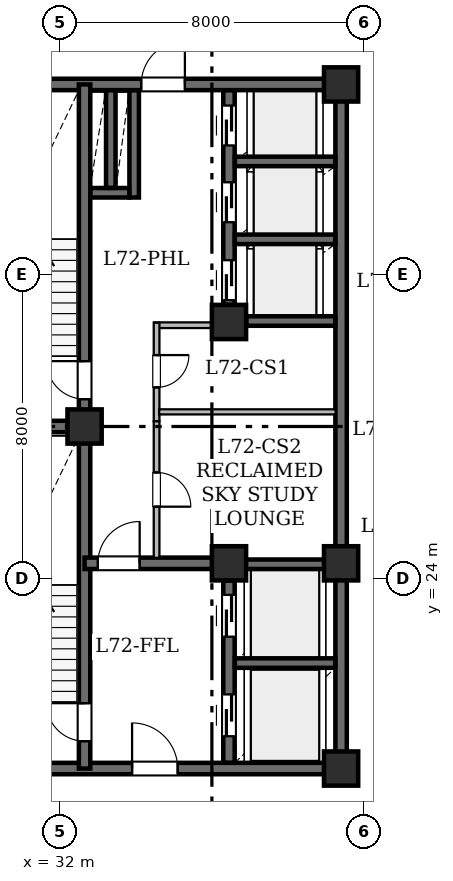
"""IFC4 building model, lengths in metres.
Left out: names, types, materials, properties, quantities, classifications, styles, units other than length and angle.
Written with IfcOpenShell. Run it as: python <this file> out.ifc"""

import sys

from ifc_helpers import new_model, si_unit, direction, frame, frame_2d, origin, origin_2d, place, context, subcontext, project, spatial, rectangle, hollow_rectangle, extrude, element, fill, save


model = new_model("IFC4")
c1 = context("Model", 3, precision=1e-05, world=origin(), true_north=direction((0.0, 1.0)))
c2 = subcontext(c1, "Body", "Model", "MODEL_VIEW")
j1 = project(units=[si_unit("LENGTHUNIT", "METRE"), si_unit("PLANEANGLEUNIT", "RADIAN")], contexts=[c1])
p1 = place(None, origin())
s1 = spatial("IfcSite", under=j1, at=p1, CompositionType="ELEMENT")
p2 = place(p1, origin())
s2 = spatial("IfcBuilding", under=s1, at=p2, CompositionType="ELEMENT")
p3 = place(p2, frame((0.0, 0.0, 282.05)))
s3 = spatial("IfcBuildingStorey", under=s2, at=p3, CompositionType="ELEMENT", Elevation=282.05)
for number, where, z_axis, x_axis in (
    (1, (32.65, 28.0, 0.0), (0.0, 0.0, 1.0), (1.0, 0.0, 0.0)),
    (2, (39.4, 19.0, 0.0), (0.0, 0.0, 1.0), (1.0, 0.0, 0.0)),
    (3, (36.45, 24.4, 0.0), (0.0, 0.0, 1.0), (1.0, 0.0, 0.0)),
    (4, (39.4, 24.4, 0.0), (0.0, 0.0, 1.0), (1.0, 0.0, 0.0)),
    (5, (36.45, 30.75, 0.0), (0.0, 0.0, 1.0), (1.0, 0.0, 0.0)),
    (6, (39.4, 37.0, 0.0), (0.0, 0.0, 1.0), (1.0, 0.0, 0.0)),
):
    element("IfcColumn", number, at=place(p3, frame(where, z_axis=z_axis, x_axis=x_axis)), inside=s3, PredefinedType="COLUMN", context=c2, shape_type="SweptSolid", body=[
        extrude(hollow_rectangle(XDim=0.9, YDim=0.9, WallThickness=0.045, at=origin_2d()), origin(), (0.0, 0.0, 1.0), 4.2),
    ])
p4 = place(p3, frame((29.0, 19.0, 0.0), z_axis=(0.0, 0.0, 1.0), x_axis=(1.0, 0.0, 0.0)))
e7 = element("IfcWall", 7, at=p4, inside=s3, PredefinedType="SHEAR", context=c2, shape_type="SweptSolid", body=[
    extrude(rectangle(XDim=10.4, YDim=0.3, at=frame_2d((5.2, 0.0))), origin(), (0.0, 0.0, 1.0), 3.78),
])
p5 = place(p4, frame((4.9, 0.0, 0.0)))
e8 = element("IfcOpeningElement", 8, at=p5, cuts=e7, PredefinedType="OPENING", context=c2, shape_type="SweptSolid", body=[
    extrude(rectangle(XDim=1.2, YDim=2.15, at=frame_2d((0.6, 1.075))), frame((0.0, 0.16, 0.0), z_axis=(0.0, -1.0, 0.0), x_axis=(1.0, 0.0, 0.0)), (0.0, 0.0, 1.0), 0.32),
])
p6 = place(p3, frame((29.0, 37.0, 0.0), z_axis=(0.0, 0.0, 1.0), x_axis=(1.0, 0.0, 0.0)))
e9 = element("IfcWall", 9, at=p6, inside=s3, PredefinedType="SHEAR", context=c2, shape_type="SweptSolid", body=[
    extrude(rectangle(XDim=10.4, YDim=0.3, at=frame_2d((5.2, 0.0))), origin(), (0.0, 0.0, 1.0), 3.78),
])
p7 = place(p6, frame((5.14, 0.0, 0.0)))
e10 = element("IfcOpeningElement", 10, at=p7, cuts=e9, PredefinedType="OPENING", context=c2, shape_type="SweptSolid", body=[
    extrude(rectangle(XDim=1.15, YDim=2.2, at=frame_2d((0.575, 1.1))), frame((0.0, 0.16, 0.0), z_axis=(0.0, -1.0, 0.0), x_axis=(1.0, 0.0, 0.0)), (0.0, 0.0, 1.0), 0.32),
])
p8 = place(p3, frame((39.4, 19.0, 0.0), z_axis=(0.0, 0.0, 1.0), x_axis=(0.0, 1.0, 0.0)))
e11 = element("IfcWall", 11, at=p8, inside=s3, PredefinedType="SHEAR", context=c2, shape_type="SweptSolid", body=[
    extrude(rectangle(XDim=5.4, YDim=0.3, at=frame_2d((2.7, 0.0))), origin(), (0.0, 0.0, 1.0), 3.78),
])
p9 = place(p3, frame((39.4, 24.4, 0.0), z_axis=(0.0, 0.0, 1.0), x_axis=(0.0, 1.0, 0.0)))
e12 = element("IfcWall", 12, at=p9, inside=s3, PredefinedType="SHEAR", context=c2, shape_type="SweptSolid", body=[
    extrude(rectangle(XDim=12.6, YDim=0.3, at=frame_2d((6.3, 0.0))), origin(), (0.0, 0.0, 1.0), 3.78),
])
p10 = place(p3, frame((32.65, 19.0, 0.0), z_axis=(0.0, 0.0, 1.0), x_axis=(0.0, 1.0, 0.0)))
e13 = element("IfcWall", 13, at=p10, inside=s3, PredefinedType="SHEAR", context=c2, shape_type="SweptSolid", body=[
    extrude(rectangle(XDim=9.0, YDim=0.3, at=frame_2d((4.5, 0.0))), origin(), (0.0, 0.0, 1.0), 3.78),
])
p11 = place(p10, frame((0.72, 0.0, 0.0)))
e14 = element("IfcOpeningElement", 14, at=p11, cuts=e13, PredefinedType="OPENING", context=c2, shape_type="SweptSolid", body=[
    extrude(rectangle(XDim=1.0, YDim=2.15, at=frame_2d((0.5, 1.075))), frame((0.0, 0.16, 0.0), z_axis=(0.0, -1.0, 0.0), x_axis=(1.0, 0.0, 0.0)), (0.0, 0.0, 1.0), 0.32),
])
p12 = place(p3, frame((32.65, 28.0, 0.0), z_axis=(0.0, 0.0, 1.0), x_axis=(0.0, 1.0, 0.0)))
e15 = element("IfcWall", 15, at=p12, inside=s3, PredefinedType="SHEAR", context=c2, shape_type="SweptSolid", body=[
    extrude(rectangle(XDim=9.0, YDim=0.3, at=frame_2d((4.5, 0.0))), origin(), (0.0, 0.0, 1.0), 3.78),
])
p13 = place(p12, frame((0.72, 0.0, 0.0)))
e16 = element("IfcOpeningElement", 16, at=p13, cuts=e15, PredefinedType="OPENING", context=c2, shape_type="SweptSolid", body=[
    extrude(rectangle(XDim=1.0, YDim=2.15, at=frame_2d((0.5, 1.075))), frame((0.0, 0.16, 0.0), z_axis=(0.0, -1.0, 0.0), x_axis=(1.0, 0.0, 0.0)), (0.0, 0.0, 1.0), 0.32),
])
p14 = place(p3, frame((29.0, 28.0, 0.0), z_axis=(0.0, 0.0, 1.0), x_axis=(1.0, 0.0, 0.0)))
e17 = element("IfcWall", 17, at=p14, inside=s3, PredefinedType="SHEAR", context=c2, shape_type="SweptSolid", body=[
    extrude(rectangle(XDim=3.65, YDim=0.3, at=frame_2d((1.825, 0.0))), origin(), (0.0, 0.0, 1.0), 3.78),
])
p15 = place(p3, frame((32.65, 24.4, 0.0), z_axis=(0.0, 0.0, 1.0), x_axis=(1.0, 0.0, 0.0)))
e18 = element("IfcWall", 18, at=p15, inside=s3, PredefinedType="SHEAR", context=c2, shape_type="SweptSolid", body=[
    extrude(rectangle(XDim=3.8, YDim=0.3, at=frame_2d((1.9, 0.0))), origin(), (0.0, 0.0, 1.0), 3.78),
])
p16 = place(p15, frame((0.35, 0.0, 0.0)))
e19 = element("IfcOpeningElement", 19, at=p16, cuts=e18, PredefinedType="OPENING", context=c2, shape_type="SweptSolid", body=[
    extrude(rectangle(XDim=1.1, YDim=2.15, at=frame_2d((0.55, 1.075))), frame((0.0, 0.16, 0.0), z_axis=(0.0, -1.0, 0.0), x_axis=(1.0, 0.0, 0.0)), (0.0, 0.0, 1.0), 0.32),
])
p17 = place(p3, frame((36.45, 19.154, 0.0), z_axis=(0.0, 0.0, 1.0), x_axis=(0.0, 1.0, 0.0)))
e20 = element("IfcWall", 20, at=p17, inside=s3, PredefinedType="SHEAR", context=c2, shape_type="SweptSolid", body=[
    extrude(rectangle(XDim=4.796, YDim=0.3, at=frame_2d((2.398, 0.0))), origin(), (0.0, 0.0, 1.0), 3.78),
])
p18 = place(p17, frame((0.696, 0.0, 0.0)))
e21 = element("IfcOpeningElement", 21, at=p18, cuts=e20, PredefinedType="OPENING", context=c2, shape_type="SweptSolid", body=[
    extrude(rectangle(XDim=1.1, YDim=2.15, at=frame_2d((0.55, 1.075))), frame((0.0, 0.16, 0.0), z_axis=(0.0, -1.0, 0.0), x_axis=(1.0, 0.0, 0.0)), (0.0, 0.0, 1.0), 0.32),
])
p19 = place(p17, frame((3.316, 0.0, 0.0)))
e22 = element("IfcOpeningElement", 22, at=p19, cuts=e20, PredefinedType="OPENING", context=c2, shape_type="SweptSolid", body=[
    extrude(rectangle(XDim=1.1, YDim=2.15, at=frame_2d((0.55, 1.075))), frame((0.0, 0.16, 0.0), z_axis=(0.0, -1.0, 0.0), x_axis=(1.0, 0.0, 0.0)), (0.0, 0.0, 1.0), 0.32),
])
p20 = place(p3, frame((36.45, 31.2, 0.0), z_axis=(0.0, 0.0, 1.0), x_axis=(0.0, 1.0, 0.0)))
e23 = element("IfcWall", 23, at=p20, inside=s3, PredefinedType="SHEAR", context=c2, shape_type="SweptSolid", body=[
    extrude(rectangle(XDim=5.646, YDim=0.3, at=frame_2d((2.823, 0.0))), origin(), (0.0, 0.0, 1.0), 3.78),
])
p21 = place(p20, frame((0.125, 0.0, 0.0)))
e24 = element("IfcOpeningElement", 24, at=p21, cuts=e23, PredefinedType="OPENING", context=c2, shape_type="SweptSolid", body=[
    extrude(rectangle(XDim=1.05, YDim=2.15, at=frame_2d((0.525, 1.075))), frame((0.0, 0.16, 0.0), z_axis=(0.0, -1.0, 0.0), x_axis=(1.0, 0.0, 0.0)), (0.0, 0.0, 1.0), 0.32),
])
p22 = place(p20, frame((2.175, 0.0, 0.0)))
e25 = element("IfcOpeningElement", 25, at=p22, cuts=e23, PredefinedType="OPENING", context=c2, shape_type="SweptSolid", body=[
    extrude(rectangle(XDim=1.05, YDim=2.15, at=frame_2d((0.525, 1.075))), frame((0.0, 0.16, 0.0), z_axis=(0.0, -1.0, 0.0), x_axis=(1.0, 0.0, 0.0)), (0.0, 0.0, 1.0), 0.32),
])
p23 = place(p20, frame((4.195, 0.0, 0.0)))
e26 = element("IfcOpeningElement", 26, at=p23, cuts=e23, PredefinedType="OPENING", context=c2, shape_type="SweptSolid", body=[
    extrude(rectangle(XDim=1.05, YDim=2.15, at=frame_2d((0.525, 1.075))), frame((0.0, 0.16, 0.0), z_axis=(0.0, -1.0, 0.0), x_axis=(1.0, 0.0, 0.0)), (0.0, 0.0, 1.0), 0.32),
])
for number, where, z_axis, x_axis in (
    (27, (36.604, 21.775, 0.0), (0.0, 0.0, 1.0), (1.0, 0.0, 0.0)),
    (28, (36.604, 24.375, 0.0), (0.0, 0.0, 1.0), (1.0, 0.0, 0.0)),
):
    element("IfcWall", number, at=place(p3, frame(where, z_axis=z_axis, x_axis=x_axis)), inside=s3, PredefinedType="SHEAR", context=c2, shape_type="SweptSolid", body=[
        extrude(rectangle(XDim=2.642, YDim=0.25, at=frame_2d((1.321, 0.0))), origin(), (0.0, 0.0, 1.0), 3.78),
    ])
p24 = place(p3, frame((36.904, 30.775, 0.0), z_axis=(0.0, 0.0, 1.0), x_axis=(1.0, 0.0, 0.0)))
e29 = element("IfcWall", 29, at=p24, inside=s3, PredefinedType="SHEAR", context=c2, shape_type="SweptSolid", body=[
    extrude(rectangle(XDim=2.342, YDim=0.25, at=frame_2d((1.171, 0.0))), origin(), (0.0, 0.0, 1.0), 3.78),
])
for number, where, z_axis, x_axis in (
    (30, (36.604, 32.925, 0.0), (0.0, 0.0, 1.0), (1.0, 0.0, 0.0)),
    (31, (36.604, 34.975, 0.0), (0.0, 0.0, 1.0), (1.0, 0.0, 0.0)),
):
    element("IfcWall", number, at=place(p3, frame(where, z_axis=z_axis, x_axis=x_axis)), inside=s3, PredefinedType="SHEAR", context=c2, shape_type="SweptSolid", body=[
        extrude(rectangle(XDim=2.642, YDim=0.25, at=frame_2d((1.321, 0.0))), origin(), (0.0, 0.0, 1.0), 3.78),
    ])
p25 = place(p3, frame((33.955, 34.025, 0.0), z_axis=(0.0, 0.0, 1.0), x_axis=(0.0, 1.0, 0.0)))
e32 = element("IfcWall", 32, at=p25, inside=s3, PredefinedType="SHEAR", context=c2, shape_type="SweptSolid", body=[
    extrude(rectangle(XDim=2.821, YDim=0.25, at=frame_2d((1.411, 0.0))), origin(), (0.0, 0.0, 1.0), 3.78),
])
p26 = place(p3, frame((32.804, 34.15, 0.0), z_axis=(0.0, 0.0, 1.0), x_axis=(1.0, 0.0, 0.0)))
e33 = element("IfcWall", 33, at=p26, inside=s3, PredefinedType="SHEAR", context=c2, shape_type="SweptSolid", body=[
    extrude(rectangle(XDim=1.022, YDim=0.25, at=frame_2d((0.511, 0.0))), origin(), (0.0, 0.0, 1.0), 3.78),
])
p27 = place(p3, frame((33.34, 34.279, 0.0), z_axis=(0.0, 0.0, 1.0), x_axis=(0.0, 1.0, 0.0)))
e34 = element("IfcWall", 34, at=p27, inside=s3, PredefinedType="SHEAR", context=c2, shape_type="SweptSolid", body=[
    extrude(rectangle(XDim=2.567, YDim=0.25, at=frame_2d((1.283, 0.0))), origin(), (0.0, 0.0, 1.0), 3.78),
])
p28 = place(p3, frame((36.3, 30.665, 0.0), z_axis=(0.0, 0.0, 1.0), x_axis=(-1.0, 0.0, 0.0)))
e35 = element("IfcWall", 35, at=p28, inside=s3, PredefinedType="STANDARD", context=c2, shape_type="SweptSolid", body=[
    extrude(rectangle(XDim=1.82, YDim=0.15, at=frame_2d((0.91, 0.0))), origin(), (0.0, 0.0, 1.0), 3.78),
])
p29 = place(p3, frame((34.545, 30.73, 0.0), z_axis=(0.0, 0.0, 1.0), x_axis=(0.0, -1.0, 0.0)))
e36 = element("IfcWall", 36, at=p29, inside=s3, PredefinedType="STANDARD", context=c2, shape_type="SweptSolid", body=[
    extrude(rectangle(XDim=2.594, YDim=0.15, at=frame_2d((1.297, 0.0))), origin(), (0.0, 0.0, 1.0), 3.78),
])
p30 = place(p29, frame((0.851, 0.0, 0.0)))
e37 = element("IfcOpeningElement", 37, at=p30, cuts=e36, PredefinedType="OPENING", context=c2, shape_type="SweptSolid", body=[
    extrude(rectangle(XDim=0.85, YDim=2.1, at=frame_2d((0.425, 1.05))), frame((0.0, 0.085, 0.0), z_axis=(0.0, -1.0, 0.0), x_axis=(1.0, 0.0, 0.0)), (0.0, 0.0, 1.0), 0.17),
])
p31 = place(p3, frame((34.545, 28.136, 0.0), z_axis=(0.0, 0.0, 1.0), x_axis=(0.0, -1.0, 0.0)))
e38 = element("IfcWall", 38, at=p31, inside=s3, PredefinedType="STANDARD", context=c2, shape_type="SweptSolid", body=[
    extrude(rectangle(XDim=3.592, YDim=0.15, at=frame_2d((1.796, 0.0))), origin(), (0.0, 0.0, 1.0), 3.78),
])
p32 = place(p31, frame((1.346, 0.0, 0.0)))
e39 = element("IfcOpeningElement", 39, at=p32, cuts=e38, PredefinedType="OPENING", context=c2, shape_type="SweptSolid", body=[
    extrude(rectangle(XDim=0.9, YDim=2.1, at=frame_2d((0.45, 1.05))), frame((0.0, 0.085, 0.0), z_axis=(0.0, -1.0, 0.0), x_axis=(1.0, 0.0, 0.0)), (0.0, 0.0, 1.0), 0.17),
])
p33 = place(p3, frame((39.256, 28.385, 0.0), z_axis=(0.0, 0.0, 1.0), x_axis=(-1.0, 0.0, 0.0)))
e40 = element("IfcWall", 40, at=p33, inside=s3, PredefinedType="PARTITIONING", context=c2, shape_type="SweptSolid", body=[
    extrude(rectangle(XDim=4.644, YDim=0.135, at=frame_2d((2.322, 0.0))), origin(), (0.0, 0.0, 1.0), 3.78),
])
p34 = place(p11, origin())
e41 = element("IfcDoor", 41, at=p34, inside=s3, OperationType="SINGLE_SWING_RIGHT", PredefinedType="DOOR", context=c2, shape_type="SweptSolid", body=[
    extrude(rectangle(XDim=1.0, YDim=2.15, at=frame_2d((0.5, 1.075))), frame((0.0, 0.025, 0.0), z_axis=(0.0, -1.0, 0.0), x_axis=(1.0, 0.0, 0.0)), (0.0, 0.0, 1.0), 0.05),
])
fill(e14, e41)
p35 = place(p13, origin())
e42 = element("IfcDoor", 42, at=p35, inside=s3, OperationType="SINGLE_SWING_RIGHT", PredefinedType="DOOR", context=c2, shape_type="SweptSolid", body=[
    extrude(rectangle(XDim=1.0, YDim=2.15, at=frame_2d((0.5, 1.075))), frame((0.0, 0.025, 0.0), z_axis=(0.0, -1.0, 0.0), x_axis=(1.0, 0.0, 0.0)), (0.0, 0.0, 1.0), 0.05),
])
fill(e16, e42)
p36 = place(p16, origin())
e43 = element("IfcDoor", 43, at=p36, inside=s3, OperationType="SINGLE_SWING_RIGHT", PredefinedType="DOOR", context=c2, shape_type="SweptSolid", body=[
    extrude(rectangle(XDim=1.1, YDim=2.15, at=frame_2d((0.55, 1.075))), frame((0.0, 0.025, 0.0), z_axis=(0.0, -1.0, 0.0), x_axis=(1.0, 0.0, 0.0)), (0.0, 0.0, 1.0), 0.05),
])
fill(e19, e43)
p37 = place(p5, origin())
e44 = element("IfcDoor", 44, at=p37, inside=s3, OperationType="SINGLE_SWING_LEFT", PredefinedType="DOOR", context=c2, shape_type="SweptSolid", body=[
    extrude(rectangle(XDim=1.2, YDim=2.15, at=frame_2d((0.6, 1.075))), frame((0.0, 0.025, 0.0), z_axis=(0.0, -1.0, 0.0), x_axis=(1.0, 0.0, 0.0)), (0.0, 0.0, 1.0), 0.05),
])
fill(e8, e44)
p38 = place(p7, origin())
e45 = element("IfcDoor", 45, at=p38, inside=s3, OperationType="SINGLE_SWING_RIGHT", PredefinedType="DOOR", context=c2, shape_type="SweptSolid", body=[
    extrude(rectangle(XDim=1.15, YDim=2.2, at=frame_2d((0.575, 1.1))), frame((0.0, 0.025, 0.0), z_axis=(0.0, -1.0, 0.0), x_axis=(1.0, 0.0, 0.0)), (0.0, 0.0, 1.0), 0.05),
])
fill(e10, e45)
p39 = place(p18, origin())
e46 = element("IfcDoor", 46, at=p39, inside=s3, OperationType="SLIDING_TO_LEFT", PredefinedType="DOOR", context=c2, shape_type="SweptSolid", body=[
    extrude(rectangle(XDim=1.1, YDim=2.15, at=frame_2d((0.55, 1.075))), frame((0.0, 0.025, 0.0), z_axis=(0.0, -1.0, 0.0), x_axis=(1.0, 0.0, 0.0)), (0.0, 0.0, 1.0), 0.05),
])
fill(e21, e46)
p40 = place(p19, origin())
e47 = element("IfcDoor", 47, at=p40, inside=s3, OperationType="SLIDING_TO_LEFT", PredefinedType="DOOR", context=c2, shape_type="SweptSolid", body=[
    extrude(rectangle(XDim=1.1, YDim=2.15, at=frame_2d((0.55, 1.075))), frame((0.0, 0.025, 0.0), z_axis=(0.0, -1.0, 0.0), x_axis=(1.0, 0.0, 0.0)), (0.0, 0.0, 1.0), 0.05),
])
fill(e22, e47)
p41 = place(p21, origin())
e48 = element("IfcDoor", 48, at=p41, inside=s3, OperationType="SLIDING_TO_LEFT", PredefinedType="DOOR", context=c2, shape_type="SweptSolid", body=[
    extrude(rectangle(XDim=1.05, YDim=2.15, at=frame_2d((0.525, 1.075))), frame((0.0, 0.025, 0.0), z_axis=(0.0, -1.0, 0.0), x_axis=(1.0, 0.0, 0.0)), (0.0, 0.0, 1.0), 0.05),
])
fill(e24, e48)
p42 = place(p22, origin())
e49 = element("IfcDoor", 49, at=p42, inside=s3, OperationType="SLIDING_TO_LEFT", PredefinedType="DOOR", context=c2, shape_type="SweptSolid", body=[
    extrude(rectangle(XDim=1.05, YDim=2.15, at=frame_2d((0.525, 1.075))), frame((0.0, 0.025, 0.0), z_axis=(0.0, -1.0, 0.0), x_axis=(1.0, 0.0, 0.0)), (0.0, 0.0, 1.0), 0.05),
])
fill(e25, e49)
p43 = place(p23, origin())
e50 = element("IfcDoor", 50, at=p43, inside=s3, OperationType="SLIDING_TO_LEFT", PredefinedType="DOOR", context=c2, shape_type="SweptSolid", body=[
    extrude(rectangle(XDim=1.05, YDim=2.15, at=frame_2d((0.525, 1.075))), frame((0.0, 0.025, 0.0), z_axis=(0.0, -1.0, 0.0), x_axis=(1.0, 0.0, 0.0)), (0.0, 0.0, 1.0), 0.05),
])
fill(e26, e50)
p44 = place(p30, origin())
e51 = element("IfcDoor", 51, at=p44, inside=s3, OperationType="SINGLE_SWING_LEFT", PredefinedType="DOOR", context=c2, shape_type="SweptSolid", body=[
    extrude(rectangle(XDim=0.85, YDim=2.1, at=frame_2d((0.425, 1.05))), frame((0.0, 0.025, 0.0), z_axis=(0.0, -1.0, 0.0), x_axis=(1.0, 0.0, 0.0)), (0.0, 0.0, 1.0), 0.05),
])
fill(e37, e51)
p45 = place(p32, origin())
e52 = element("IfcDoor", 52, at=p45, inside=s3, OperationType="SINGLE_SWING_RIGHT", PredefinedType="DOOR", context=c2, shape_type="SweptSolid", body=[
    extrude(rectangle(XDim=0.9, YDim=2.1, at=frame_2d((0.45, 1.05))), frame((0.0, 0.025, 0.0), z_axis=(0.0, -1.0, 0.0), x_axis=(1.0, 0.0, 0.0)), (0.0, 0.0, 1.0), 0.05),
])
fill(e39, e52)
save(model, sys.argv[1])
